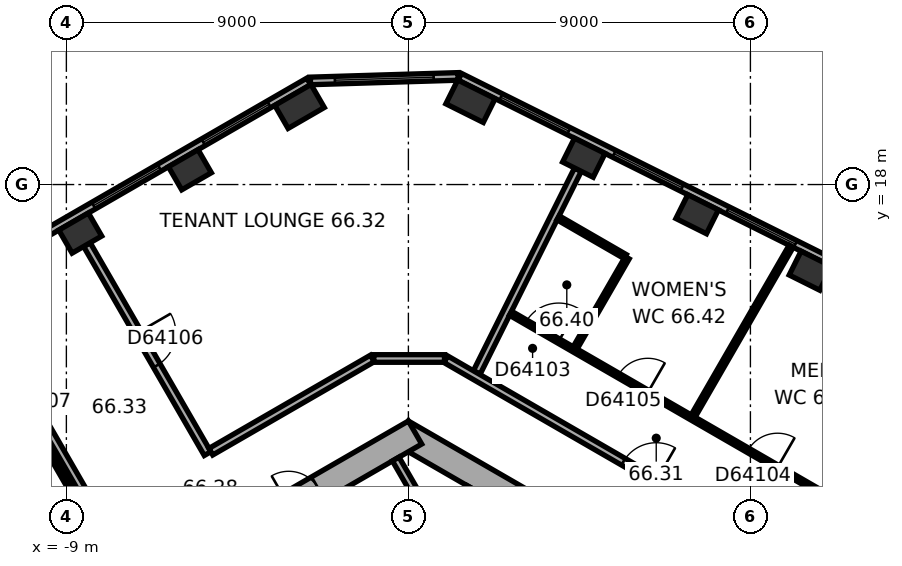
"""IFC4 building model, lengths in metres.
Left out: names, types, materials, properties, quantities, classifications, styles, units other than length and angle.
Written with IfcOpenShell. Run it as: python <this file> out.ifc"""

import sys

from ifc_helpers import new_model, si_unit, direction, frame, frame_2d, origin, origin_2d, place, context, subcontext, project, spatial, rectangle, extrude, element, fill, save


model = new_model("IFC4")
c1 = context("Model", 3, precision=1e-05, world=origin(), true_north=direction((0.0, 1.0)))
c2 = subcontext(c1, "Body", "Model", "MODEL_VIEW")
j1 = project(units=[si_unit("LENGTHUNIT", "METRE"), si_unit("PLANEANGLEUNIT", "RADIAN")], contexts=[c1])
p1 = place(None, origin())
s1 = spatial("IfcSite", under=j1, at=p1, CompositionType="ELEMENT")
p2 = place(p1, origin())
s2 = spatial("IfcBuilding", under=s1, at=p2, CompositionType="ELEMENT")
p3 = place(p2, frame((0.0, 0.0, 267.2)))
s3 = spatial("IfcBuildingStorey", under=s2, at=p3, CompositionType="ELEMENT", Elevation=267.2)
for number, where, z_axis, x_axis in (
    (1, (10.58, 15.732, 0.0), (0.0, 0.0, 1.0), (-0.895, 0.446, 0.0)),
    (2, (7.598, 17.219, 0.0), (0.0, 0.0, 1.0), (-0.895, 0.446, 0.0)),
    (3, (4.616, 18.706, 0.0), (0.0, 0.0, 1.0), (-0.895, 0.446, 0.0)),
):
    element("IfcColumn", number, at=place(p3, frame(where, z_axis=z_axis, x_axis=x_axis)), inside=s3, PredefinedType="COLUMN", context=c2, shape_type="SweptSolid", body=[
        extrude(rectangle(XDim=0.9, YDim=0.7, at=origin_2d()), origin(), (0.0, 0.0, 1.0), 3.7),
    ])
for number, where, z_axis, x_axis in (
    (4, (1.635, 20.192, 0.0), (0.0, 0.0, 1.0), (-0.895, 0.446, 0.0)),
    (5, (-2.864, 20.055, 0.0), (0.0, 0.0, 1.0), (-0.866, -0.5, 0.0)),
):
    element("IfcColumn", number, at=place(p3, frame(where, z_axis=z_axis, x_axis=x_axis)), inside=s3, PredefinedType="COLUMN", context=c2, shape_type="SweptSolid", body=[
        extrude(rectangle(XDim=1.1, YDim=0.7, at=origin_2d()), origin(), (0.0, 0.0, 1.0), 3.7),
    ])
for number, where, z_axis, x_axis in (
    (6, (-5.75, 18.389, 0.0), (0.0, 0.0, 1.0), (-0.866, -0.5, 0.0)),
    (7, (-8.635, 16.723, 0.0), (0.0, 0.0, 1.0), (-0.866, -0.5, 0.0)),
):
    element("IfcColumn", number, at=place(p3, frame(where, z_axis=z_axis, x_axis=x_axis)), inside=s3, PredefinedType="COLUMN", context=c2, shape_type="SweptSolid", body=[
        extrude(rectangle(XDim=0.9, YDim=0.7, at=origin_2d()), origin(), (0.0, 0.0, 1.0), 3.7),
    ])
p4 = place(p3, frame((10.025, 5.586, 0.0), z_axis=(0.0, 0.0, 1.0), x_axis=(-0.866026453023, 0.499998182661, 0.0)))
e8 = element("IfcWall", 8, at=p4, inside=s3, PredefinedType="SHEAR", context=c2, shape_type="SweptSolid", body=[
    extrude(rectangle(XDim=11.778, YDim=0.7, at=frame_2d((5.889, 0.0))), origin(), (0.0, 0.0, 1.0), 3.7),
])
p5 = place(p4, frame((5.139, 0.0, 0.0)))
e9 = element("IfcOpeningElement", 9, at=p5, cuts=e8, PredefinedType="OPENING", context=c2, shape_type="SweptSolid", body=[
    extrude(rectangle(XDim=0.9, YDim=2.1, at=frame_2d((0.45, 1.05))), frame((0.0, 0.36, 0.0), z_axis=(0.0, -1.0, 0.0), x_axis=(1.0, 0.0, 0.0)), (0.0, 0.0, 1.0), 0.72),
])
p6 = place(p3, frame((0.175, 11.475, 0.0), z_axis=(0.0, 0.0, 1.0), x_axis=(-0.866026453023, -0.499998182661, 0.0)))
e10 = element("IfcWall", 10, at=p6, inside=s3, PredefinedType="SHEAR", context=c2, shape_type="SweptSolid", body=[
    extrude(rectangle(XDim=11.778, YDim=0.7, at=frame_2d((5.889, 0.0))), origin(), (0.0, 0.0, 1.0), 3.7),
])
p7 = place(p6, frame((6.089, 0.0, 0.0)))
e11 = element("IfcOpeningElement", 11, at=p7, cuts=e10, PredefinedType="OPENING", context=c2, shape_type="SweptSolid", body=[
    extrude(rectangle(XDim=1.5, YDim=2.1, at=frame_2d((0.75, 1.05))), frame((0.0, 0.36, 0.0), z_axis=(0.0, -1.0, 0.0), x_axis=(1.0, 0.0, 0.0)), (0.0, 0.0, 1.0), 0.72),
])
p8 = place(p6, frame((2.939, 0.0, 0.0)))
e12 = element("IfcOpeningElement", 12, at=p8, cuts=e10, PredefinedType="OPENING", context=c2, shape_type="SweptSolid", body=[
    extrude(rectangle(XDim=0.9, YDim=2.1, at=frame_2d((0.45, 1.05))), frame((0.0, 0.36, 0.0), z_axis=(0.0, -1.0, 0.0), x_axis=(1.0, 0.0, 0.0)), (0.0, 0.0, 1.0), 0.72),
])
p9 = place(p3, frame((17.223, 12.923, 0.0), z_axis=(0.0, 0.0, 1.0), x_axis=(-0.894930561148, 0.44620543556, 0.0)))
e13 = element("IfcWall", 13, at=p9, inside=s3, PredefinedType="STANDARD", context=c2, shape_type="SweptSolid", body=[
    extrude(rectangle(XDim=17.731, YDim=0.2, at=frame_2d((8.866, 0.0))), origin(), (0.0, 0.0, 1.0), 3.7),
])
p10 = place(p9, frame((1.202, 0.0, 0.9)))
e14 = element("IfcOpeningElement", 14, at=p10, cuts=e13, PredefinedType="OPENING", context=c2, shape_type="SweptSolid", body=[
    extrude(rectangle(XDim=2.0, YDim=2.0, at=frame_2d((1.0, 1.0))), frame((0.0, 0.11, 0.0), z_axis=(0.0, -1.0, 0.0), x_axis=(1.0, 0.0, 0.0)), (0.0, 0.0, 1.0), 0.22),
])
p11 = place(p9, frame((4.533, 0.0, 0.9)))
e15 = element("IfcOpeningElement", 15, at=p11, cuts=e13, PredefinedType="OPENING", context=c2, shape_type="SweptSolid", body=[
    extrude(rectangle(XDim=2.0, YDim=2.0, at=frame_2d((1.0, 1.0))), frame((0.0, 0.11, 0.0), z_axis=(0.0, -1.0, 0.0), x_axis=(1.0, 0.0, 0.0)), (0.0, 0.0, 1.0), 0.22),
])
p12 = place(p9, frame((7.865, 0.0, 0.9)))
e16 = element("IfcOpeningElement", 16, at=p12, cuts=e13, PredefinedType="OPENING", context=c2, shape_type="SweptSolid", body=[
    extrude(rectangle(XDim=2.0, YDim=2.0, at=frame_2d((1.0, 1.0))), frame((0.0, 0.11, 0.0), z_axis=(0.0, -1.0, 0.0), x_axis=(1.0, 0.0, 0.0)), (0.0, 0.0, 1.0), 0.22),
])
p13 = place(p9, frame((11.197, 0.0, 0.9)))
e17 = element("IfcOpeningElement", 17, at=p13, cuts=e13, PredefinedType="OPENING", context=c2, shape_type="SweptSolid", body=[
    extrude(rectangle(XDim=2.0, YDim=2.0, at=frame_2d((1.0, 1.0))), frame((0.0, 0.11, 0.0), z_axis=(0.0, -1.0, 0.0), x_axis=(1.0, 0.0, 0.0)), (0.0, 0.0, 1.0), 0.22),
])
p14 = place(p9, frame((14.528, 0.0, 0.9)))
e18 = element("IfcOpeningElement", 18, at=p14, cuts=e13, PredefinedType="OPENING", context=c2, shape_type="SweptSolid", body=[
    extrude(rectangle(XDim=2.0, YDim=2.0, at=frame_2d((1.0, 1.0))), frame((0.0, 0.11, 0.0), z_axis=(0.0, -1.0, 0.0), x_axis=(1.0, 0.0, 0.0)), (0.0, 0.0, 1.0), 0.22),
])
p15 = place(p3, frame((1.307, 20.845, 0.0), z_axis=(0.0, 0.0, 1.0), x_axis=(-0.999533654813, -0.030536419175, 0.0)))
e19 = element("IfcWall", 19, at=p15, inside=s3, PredefinedType="STANDARD", context=c2, shape_type="SweptSolid", body=[
    extrude(rectangle(XDim=3.885, YDim=0.2, at=frame_2d((1.943, 0.0))), origin(), (0.0, 0.0, 1.0), 3.7),
])
p16 = place(p15, frame((0.643, 0.0, 0.9)))
e20 = element("IfcOpeningElement", 20, at=p16, cuts=e19, PredefinedType="OPENING", context=c2, shape_type="SweptSolid", body=[
    extrude(rectangle(XDim=2.6, YDim=2.0, at=frame_2d((1.3, 1.0))), frame((0.0, 0.11, 0.0), z_axis=(0.0, -1.0, 0.0), x_axis=(1.0, 0.0, 0.0)), (0.0, 0.0, 1.0), 0.22),
])
p17 = place(p3, frame((-2.624, 20.713, 0.0), z_axis=(0.0, 0.0, 1.0), x_axis=(-0.866026460444, -0.499998169808, 0.0)))
e21 = element("IfcWall", 21, at=p17, inside=s3, PredefinedType="STANDARD", context=c2, shape_type="SweptSolid", body=[
    extrude(rectangle(XDim=17.731, YDim=0.2, at=frame_2d((8.866, 0.0))), origin(), (0.0, 0.0, 1.0), 3.7),
])
p18 = place(p17, frame((1.203, 0.0, 0.9)))
e22 = element("IfcOpeningElement", 22, at=p18, cuts=e21, PredefinedType="OPENING", context=c2, shape_type="SweptSolid", body=[
    extrude(rectangle(XDim=2.0, YDim=2.0, at=frame_2d((1.0, 1.0))), frame((0.0, 0.11, 0.0), z_axis=(0.0, -1.0, 0.0), x_axis=(1.0, 0.0, 0.0)), (0.0, 0.0, 1.0), 0.22),
])
p19 = place(p17, frame((4.535, 0.0, 0.9)))
e23 = element("IfcOpeningElement", 23, at=p19, cuts=e21, PredefinedType="OPENING", context=c2, shape_type="SweptSolid", body=[
    extrude(rectangle(XDim=2.0, YDim=2.0, at=frame_2d((1.0, 1.0))), frame((0.0, 0.11, 0.0), z_axis=(0.0, -1.0, 0.0), x_axis=(1.0, 0.0, 0.0)), (0.0, 0.0, 1.0), 0.22),
])
p20 = place(p17, frame((7.867, 0.0, 0.9)))
e24 = element("IfcOpeningElement", 24, at=p20, cuts=e21, PredefinedType="OPENING", context=c2, shape_type="SweptSolid", body=[
    extrude(rectangle(XDim=2.0, YDim=2.0, at=frame_2d((1.0, 1.0))), frame((0.0, 0.11, 0.0), z_axis=(0.0, -1.0, 0.0), x_axis=(1.0, 0.0, 0.0)), (0.0, 0.0, 1.0), 0.22),
])
p21 = place(p17, frame((11.198, 0.0, 0.9)))
e25 = element("IfcOpeningElement", 25, at=p21, cuts=e21, PredefinedType="OPENING", context=c2, shape_type="SweptSolid", body=[
    extrude(rectangle(XDim=2.0, YDim=2.0, at=frame_2d((1.0, 1.0))), frame((0.0, 0.11, 0.0), z_axis=(0.0, -1.0, 0.0), x_axis=(1.0, 0.0, 0.0)), (0.0, 0.0, 1.0), 0.22),
])
p22 = place(p17, frame((14.53, 0.0, 0.9)))
e26 = element("IfcOpeningElement", 26, at=p22, cuts=e21, PredefinedType="OPENING", context=c2, shape_type="SweptSolid", body=[
    extrude(rectangle(XDim=2.0, YDim=2.0, at=frame_2d((1.0, 1.0))), frame((0.0, 0.11, 0.0), z_axis=(0.0, -1.0, 0.0), x_axis=(1.0, 0.0, 0.0)), (0.0, 0.0, 1.0), 0.22),
])
p23 = place(p3, frame((0.532, 8.122, 0.0), z_axis=(0.0, 0.0, 1.0), x_axis=(0.500077893725, 0.86598042715, 0.0)))
e27 = element("IfcWall", 27, at=p23, inside=s3, PredefinedType="PARTITIONING", context=c2, shape_type="SweptSolid", body=[
    extrude(rectangle(XDim=2.2, YDim=0.2, at=frame_2d((1.1, 0.0))), origin(), (0.0, 0.0, 1.0), 3.42),
])
p24 = place(p3, frame((0.767, 8.872, 0.0), z_axis=(0.0, 0.0, 1.0), x_axis=(-0.499994660107, 0.866028486751, 0.0)))
e28 = element("IfcWall", 28, at=p24, inside=s3, PredefinedType="PARTITIONING", context=c2, shape_type="SweptSolid", body=[
    extrude(rectangle(XDim=2.2, YDim=0.2, at=frame_2d((1.1, 0.0))), origin(), (0.0, 0.0, 1.0), 3.42),
])
p25 = place(p3, frame((-11.345, 14.754, 0.0), z_axis=(0.0, 0.0, 1.0), x_axis=(0.500005339912, -0.866022320763, 0.0)))
e29 = element("IfcWall", 29, at=p25, inside=s3, PredefinedType="PARTITIONING", context=c2, shape_type="SweptSolid", body=[
    extrude(rectangle(XDim=6.35, YDim=0.2, at=frame_2d((3.175, 0.0))), origin(), (0.0, 0.0, 1.0), 3.42),
])
p26 = place(p25, frame((2.675, 0.0, 0.0)))
e30 = element("IfcOpeningElement", 30, at=p26, cuts=e29, PredefinedType="OPENING", context=c2, shape_type="SweptSolid", body=[
    extrude(rectangle(XDim=1.0, YDim=2.1, at=frame_2d((0.5, 1.05))), frame((0.0, 0.11, 0.0), z_axis=(0.0, -1.0, 0.0), x_axis=(1.0, 0.0, 0.0)), (0.0, 0.0, 1.0), 0.22),
])
p27 = place(p3, frame((-9.557, 11.156, 0.0), z_axis=(0.0, 0.0, 1.0), x_axis=(0.49994888933, -0.866054910533, 0.0)))
e31 = element("IfcWall", 31, at=p27, inside=s3, PredefinedType="PARTITIONING", context=c2, shape_type="SweptSolid", body=[
    extrude(rectangle(XDim=2.24, YDim=0.12, at=frame_2d((1.12, 0.0))), origin(), (0.0, 0.0, 1.0), 3.42),
])
p28 = place(p3, frame((-8.46, 16.42, 0.0), z_axis=(0.0, 0.0, 1.0), x_axis=(0.500005339912, -0.866022320763, 0.0)))
e32 = element("IfcWall", 32, at=p28, inside=s3, PredefinedType="PARTITIONING", context=c2, shape_type="SweptSolid", body=[
    extrude(rectangle(XDim=6.35, YDim=0.2, at=frame_2d((3.175, 0.0))), origin(), (0.0, 0.0, 1.0), 2.87),
])
p29 = place(p28, frame((2.675, 0.0, 0.0)))
e33 = element("IfcOpeningElement", 33, at=p29, cuts=e32, PredefinedType="OPENING", context=c2, shape_type="SweptSolid", body=[
    extrude(rectangle(XDim=1.0, YDim=2.1, at=frame_2d((0.5, 1.05))), frame((0.0, 0.11, 0.0), z_axis=(0.0, -1.0, 0.0), x_axis=(1.0, 0.0, 0.0)), (0.0, 0.0, 1.0), 0.22),
])
p30 = place(p3, frame((-0.95, 13.423, 0.0), z_axis=(0.0, 0.0, 1.0), x_axis=(-0.86603557629, -0.499982380289, 0.0)))
e34 = element("IfcWall", 34, at=p30, inside=s3, PredefinedType="PARTITIONING", context=c2, shape_type="SweptSolid", body=[
    extrude(rectangle(XDim=4.906, YDim=0.2, at=frame_2d((2.453, 0.0))), origin(), (0.0, 0.0, 1.0), 3.42),
])
p31 = place(p3, frame((0.95, 13.423, 0.0), z_axis=(0.0, 0.0, 1.0), x_axis=(-1.0, 0.0, 0.0)))
e35 = element("IfcWall", 35, at=p31, inside=s3, PredefinedType="PARTITIONING", context=c2, shape_type="SweptSolid", body=[
    extrude(rectangle(XDim=1.86, YDim=0.2, at=frame_2d((0.93, 0.0))), origin(), (0.0, 0.0, 1.0), 3.42),
])
p32 = place(p3, frame((4.388, 13.702, 0.0), z_axis=(0.0, 0.0, 1.0), x_axis=(0.500048966069, 0.865997131366, 0.0)))
e36 = element("IfcWall", 36, at=p32, inside=s3, PredefinedType="PARTITIONING", context=c2, shape_type="SweptSolid", body=[
    extrude(rectangle(XDim=2.74, YDim=0.12, at=frame_2d((1.37, 0.0))), origin(), (0.0, 0.0, 1.0), 3.42),
])
p33 = place(p3, frame((4.46, 18.392, 0.0), z_axis=(0.0, 0.0, 1.0), x_axis=(-0.446197360024, -0.894934587502, 0.0)))
e37 = element("IfcWall", 37, at=p33, inside=s3, PredefinedType="PARTITIONING", context=c2, shape_type="SweptSolid", body=[
    extrude(rectangle(XDim=5.96, YDim=0.2, at=frame_2d((2.98, 0.0))), origin(), (0.0, 0.0, 1.0), 2.87),
])
p34 = place(p3, frame((5.706, 16.104, 0.0), z_axis=(0.0, 0.0, 1.0), x_axis=(-0.866040114423, 0.499974519561, 0.0)))
e38 = element("IfcWall", 38, at=p34, inside=s3, PredefinedType="PARTITIONING", context=c2, shape_type="SweptSolid", body=[
    extrude(rectangle(XDim=2.04, YDim=0.12, at=frame_2d((1.02, 0.0))), origin(), (0.0, 0.0, 1.0), 3.42),
])
p35 = place(p3, frame((10.072, 16.376, 0.0), z_axis=(0.0, 0.0, 1.0), x_axis=(-0.499972385701, -0.86604134632, 0.0)))
e39 = element("IfcWall", 39, at=p35, inside=s3, PredefinedType="PARTITIONING", context=c2, shape_type="SweptSolid", body=[
    extrude(rectangle(XDim=5.158, YDim=0.12, at=frame_2d((2.579, 0.0))), origin(), (0.0, 0.0, 1.0), 2.87),
])
p36 = place(p3, frame((11.15, 7.534, 0.0), z_axis=(0.0, 0.0, 1.0), x_axis=(-0.866026603062, 0.499997922785, 0.0)))
e40 = element("IfcWall", 40, at=p36, inside=s3, PredefinedType="PARTITIONING", context=c2, shape_type="SweptSolid", body=[
    extrude(rectangle(XDim=11.738, YDim=0.2, at=frame_2d((5.869, 0.0))), origin(), (0.0, 0.0, 1.0), 3.42),
])
p37 = place(p36, frame((5.345, 0.0, 0.0)))
e41 = element("IfcOpeningElement", 41, at=p37, cuts=e40, PredefinedType="OPENING", context=c2, shape_type="SweptSolid", body=[
    extrude(rectangle(XDim=1.0, YDim=2.1, at=frame_2d((0.5, 1.05))), frame((0.0, 0.11, 0.0), z_axis=(0.0, -1.0, 0.0), x_axis=(1.0, 0.0, 0.0)), (0.0, 0.0, 1.0), 0.22),
])
p38 = place(p3, frame((11.187, 9.707, 0.0), z_axis=(0.0, 0.0, 1.0), x_axis=(-0.866033133531, 0.499986611447, 0.0)))
e42 = element("IfcWall", 42, at=p38, inside=s3, PredefinedType="PARTITIONING", context=c2, shape_type="SweptSolid", body=[
    extrude(rectangle(XDim=9.814, YDim=0.12, at=frame_2d((4.907, 0.0))), origin(), (0.0, 0.0, 1.0), 3.42),
])
p39 = place(p38, frame((8.349, 0.0, 0.0)))
e43 = element("IfcOpeningElement", 43, at=p39, cuts=e42, PredefinedType="OPENING", context=c2, shape_type="SweptSolid", body=[
    extrude(rectangle(XDim=1.0, YDim=2.1, at=frame_2d((0.5, 1.05))), frame((0.0, 0.07, 0.0), z_axis=(0.0, -1.0, 0.0), x_axis=(1.0, 0.0, 0.0)), (0.0, 0.0, 1.0), 0.14),
])
p40 = place(p38, frame((1.7, 0.0, 0.0)))
e44 = element("IfcOpeningElement", 44, at=p40, cuts=e42, PredefinedType="OPENING", context=c2, shape_type="SweptSolid", body=[
    extrude(rectangle(XDim=0.9, YDim=2.1, at=frame_2d((0.45, 1.05))), frame((0.0, 0.07, 0.0), z_axis=(0.0, -1.0, 0.0), x_axis=(1.0, 0.0, 0.0)), (0.0, 0.0, 1.0), 0.14),
])
p41 = place(p38, frame((5.642, 0.0, 0.0)))
e45 = element("IfcOpeningElement", 45, at=p41, cuts=e42, PredefinedType="OPENING", context=c2, shape_type="SweptSolid", body=[
    extrude(rectangle(XDim=0.9, YDim=2.1, at=frame_2d((0.45, 1.05))), frame((0.0, 0.07, 0.0), z_axis=(0.0, -1.0, 0.0), x_axis=(1.0, 0.0, 0.0)), (0.0, 0.0, 1.0), 0.14),
])
p42 = place(p3, frame((13.405, 13.933, 0.0), z_axis=(0.0, 0.0, 1.0), x_axis=(-0.446187838644, -0.894939334618, 0.0)))
e46 = element("IfcWall", 46, at=p42, inside=s3, PredefinedType="PARTITIONING", context=c2, shape_type="SweptSolid", body=[
    extrude(rectangle(XDim=6.571, YDim=0.2, at=frame_2d((3.286, 0.0))), origin(), (0.0, 0.0, 1.0), 3.42),
])
p43 = place(p12, origin())
e47 = element("IfcWindow", 47, at=p43, inside=s3, PartitioningType="SINGLE_PANEL", PredefinedType="WINDOW", context=c2, shape_type="SweptSolid", body=[
    extrude(rectangle(XDim=2.0, YDim=2.0, at=frame_2d((1.0, 1.0))), frame((0.0, 0.03, 0.0), z_axis=(0.0, -1.0, 0.0), x_axis=(1.0, 0.0, 0.0)), (0.0, 0.0, 1.0), 0.06),
])
fill(e16, e47)
p44 = place(p13, origin())
e48 = element("IfcWindow", 48, at=p44, inside=s3, PartitioningType="SINGLE_PANEL", PredefinedType="WINDOW", context=c2, shape_type="SweptSolid", body=[
    extrude(rectangle(XDim=2.0, YDim=2.0, at=frame_2d((1.0, 1.0))), frame((0.0, 0.03, 0.0), z_axis=(0.0, -1.0, 0.0), x_axis=(1.0, 0.0, 0.0)), (0.0, 0.0, 1.0), 0.06),
])
fill(e17, e48)
p45 = place(p14, origin())
e49 = element("IfcWindow", 49, at=p45, inside=s3, PartitioningType="SINGLE_PANEL", PredefinedType="WINDOW", context=c2, shape_type="SweptSolid", body=[
    extrude(rectangle(XDim=2.0, YDim=2.0, at=frame_2d((1.0, 1.0))), frame((0.0, 0.03, 0.0), z_axis=(0.0, -1.0, 0.0), x_axis=(1.0, 0.0, 0.0)), (0.0, 0.0, 1.0), 0.06),
])
fill(e18, e49)
p46 = place(p16, origin())
e50 = element("IfcWindow", 50, at=p46, inside=s3, PartitioningType="SINGLE_PANEL", PredefinedType="WINDOW", context=c2, shape_type="SweptSolid", body=[
    extrude(rectangle(XDim=2.6, YDim=2.0, at=frame_2d((1.3, 1.0))), frame((0.0, 0.03, 0.0), z_axis=(0.0, -1.0, 0.0), x_axis=(1.0, 0.0, 0.0)), (0.0, 0.0, 1.0), 0.06),
])
fill(e20, e50)
p47 = place(p18, origin())
e51 = element("IfcWindow", 51, at=p47, inside=s3, PartitioningType="SINGLE_PANEL", PredefinedType="WINDOW", context=c2, shape_type="SweptSolid", body=[
    extrude(rectangle(XDim=2.0, YDim=2.0, at=frame_2d((1.0, 1.0))), frame((0.0, 0.03, 0.0), z_axis=(0.0, -1.0, 0.0), x_axis=(1.0, 0.0, 0.0)), (0.0, 0.0, 1.0), 0.06),
])
fill(e22, e51)
p48 = place(p19, origin())
e52 = element("IfcWindow", 52, at=p48, inside=s3, PartitioningType="SINGLE_PANEL", PredefinedType="WINDOW", context=c2, shape_type="SweptSolid", body=[
    extrude(rectangle(XDim=2.0, YDim=2.0, at=frame_2d((1.0, 1.0))), frame((0.0, 0.03, 0.0), z_axis=(0.0, -1.0, 0.0), x_axis=(1.0, 0.0, 0.0)), (0.0, 0.0, 1.0), 0.06),
])
fill(e23, e52)
p49 = place(p37, origin())
e53 = element("IfcDoor", 53, at=p49, inside=s3, OperationType="SINGLE_SWING_LEFT", PredefinedType="DOOR", context=c2, shape_type="SweptSolid", body=[
    extrude(rectangle(XDim=1.0, YDim=2.1, at=frame_2d((0.5, 1.05))), frame((0.0, 0.025, 0.0), z_axis=(0.0, -1.0, 0.0), x_axis=(1.0, 0.0, 0.0)), (0.0, 0.0, 1.0), 0.05),
])
fill(e41, e53)
p50 = place(p39, origin())
e54 = element("IfcDoor", 54, at=p50, inside=s3, OperationType="SINGLE_SWING_LEFT", PredefinedType="DOOR", context=c2, shape_type="SweptSolid", body=[
    extrude(rectangle(XDim=1.0, YDim=2.1, at=frame_2d((0.5, 1.05))), frame((0.0, 0.025, 0.0), z_axis=(0.0, -1.0, 0.0), x_axis=(1.0, 0.0, 0.0)), (0.0, 0.0, 1.0), 0.05),
])
fill(e43, e54)
p51 = place(p40, origin())
e55 = element("IfcDoor", 55, at=p51, inside=s3, OperationType="SINGLE_SWING_LEFT", PredefinedType="DOOR", context=c2, shape_type="SweptSolid", body=[
    extrude(rectangle(XDim=0.9, YDim=2.1, at=frame_2d((0.45, 1.05))), frame((0.0, 0.025, 0.0), z_axis=(0.0, -1.0, 0.0), x_axis=(1.0, 0.0, 0.0)), (0.0, 0.0, 1.0), 0.05),
])
fill(e44, e55)
p52 = place(p41, origin())
e56 = element("IfcDoor", 56, at=p52, inside=s3, OperationType="SINGLE_SWING_LEFT", PredefinedType="DOOR", context=c2, shape_type="SweptSolid", body=[
    extrude(rectangle(XDim=0.9, YDim=2.1, at=frame_2d((0.45, 1.05))), frame((0.0, 0.025, 0.0), z_axis=(0.0, -1.0, 0.0), x_axis=(1.0, 0.0, 0.0)), (0.0, 0.0, 1.0), 0.05),
])
fill(e45, e56)
p53 = place(p29, origin())
e57 = element("IfcDoor", 57, at=p53, inside=s3, OperationType="SINGLE_SWING_LEFT", PredefinedType="DOOR", context=c2, shape_type="SweptSolid", body=[
    extrude(rectangle(XDim=1.0, YDim=2.1, at=frame_2d((0.5, 1.05))), frame((0.0, 0.025, 0.0), z_axis=(0.0, -1.0, 0.0), x_axis=(1.0, 0.0, 0.0)), (0.0, 0.0, 1.0), 0.05),
])
fill(e33, e57)
save(model, sys.argv[1])
